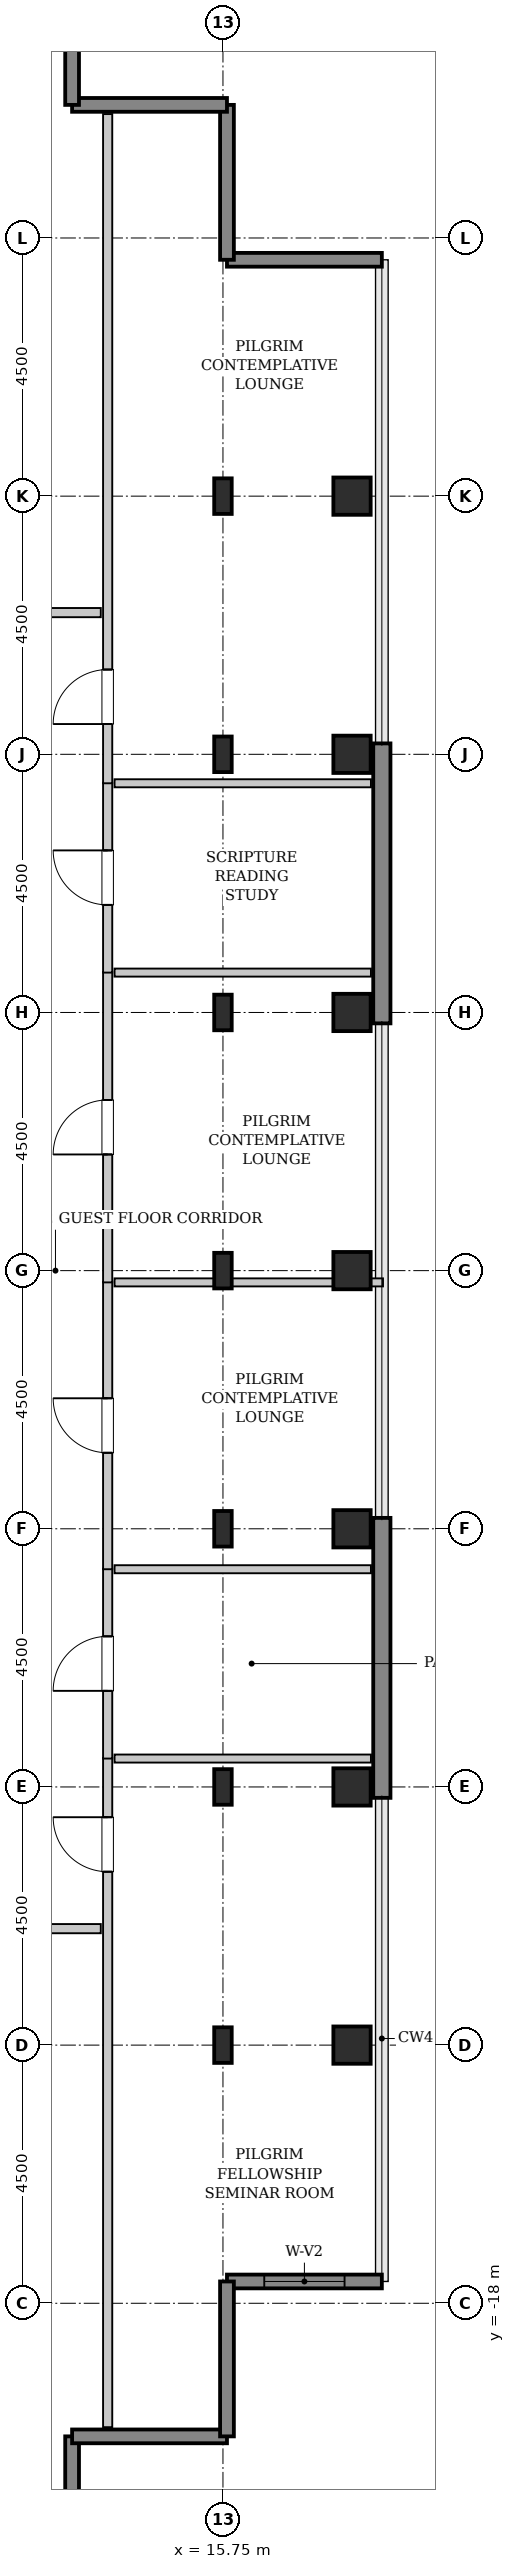
"""IFC4 building model, lengths in metres.
Left out: names, types, materials, properties, quantities, classifications, styles, units other than length and angle.
Written with IfcOpenShell. Run it as: python <this file> out.ifc"""

import sys

from ifc_helpers import new_model, si_unit, direction, frame, frame_2d, origin, origin_2d, place, context, subcontext, project, spatial, rectangle, hollow_rectangle, i_section, extrude, source, transform, mapped, element, fill, save


model = new_model("IFC4")
c1 = context("Model", 3, precision=1e-05, world=origin(), true_north=direction((0.0, 1.0)))
c2 = subcontext(c1, "Body", "Model", "MODEL_VIEW")
j1 = project(units=[si_unit("LENGTHUNIT", "METRE"), si_unit("PLANEANGLEUNIT", "RADIAN")], contexts=[c1])
p1 = place(None, origin())
s1 = spatial("IfcSite", under=j1, at=p1, CompositionType="ELEMENT")
p2 = place(p1, origin())
s2 = spatial("IfcBuilding", under=s1, at=p2, CompositionType="ELEMENT")
p3 = place(p2, frame((0.0, 0.0, 287.4)))
s3 = spatial("IfcBuildingStorey", under=s2, at=p3, CompositionType="ELEMENT", Elevation=287.4)
m1 = source(origin(), c2, "Body", "SweptSolid", [
    extrude(i_section(OverallWidth=0.305, OverallDepth=0.62, WebThickness=0.021, FlangeThickness=0.04, FilletRadius=0.027, at=origin_2d()), origin(), (0.0, 0.0, 1.0), 3.8),
])
for number, where, z_axis, x_axis in (
    (1, (15.75, -13.5, 0.0), (0.0, 0.0, 1.0), (1.0, 0.0, 0.0)),
    (2, (15.75, -9.0, 0.0), (0.0, 0.0, 1.0), (1.0, 0.0, 0.0)),
    (3, (15.75, -4.5, 0.0), (0.0, 0.0, 1.0), (1.0, 0.0, 0.0)),
    (4, (15.75, 0.0, 0.0), (0.0, 0.0, 1.0), (1.0, 0.0, 0.0)),
    (5, (15.75, 4.5, 0.0), (0.0, 0.0, 1.0), (1.0, 0.0, 0.0)),
    (6, (15.75, 9.0, 0.0), (0.0, 0.0, 1.0), (1.0, 0.0, 0.0)),
    (7, (15.75, 13.5, 0.0), (0.0, 0.0, 1.0), (1.0, 0.0, 0.0)),
):
    element("IfcColumn", number, at=place(p3, frame(where, z_axis=z_axis, x_axis=x_axis)), inside=s3, PredefinedType="COLUMN", context=c2, shape_type="MappedRepresentation", body=[
        mapped(m1, transform((0.0, 0.0, 0.0), x_axis=(1.0, 0.0, 0.0), y_axis=(0.0, 1.0, 0.0), z_axis=(0.0, 0.0, 1.0), scale=1.0)),
    ])
m2 = source(origin(), c2, "Body", "SweptSolid", [
    extrude(hollow_rectangle(XDim=0.65, YDim=0.65, WallThickness=0.032, InnerFilletRadius=0.032, OuterFilletRadius=0.064, at=origin_2d()), origin(), (0.0, 0.0, 1.0), 3.8),
])
for number, where, z_axis, x_axis in (
    (8, (18.0, -13.5, 0.0), (0.0, 0.0, 1.0), (1.0, 0.0, 0.0)),
    (9, (18.0, -9.0, 0.0), (0.0, 0.0, 1.0), (1.0, 0.0, 0.0)),
    (10, (18.0, -4.5, 0.0), (0.0, 0.0, 1.0), (1.0, 0.0, 0.0)),
    (11, (18.0, 0.0, 0.0), (0.0, 0.0, 1.0), (1.0, 0.0, 0.0)),
    (12, (18.0, 4.5, 0.0), (0.0, 0.0, 1.0), (1.0, 0.0, 0.0)),
    (13, (18.0, 9.0, 0.0), (0.0, 0.0, 1.0), (1.0, 0.0, 0.0)),
    (14, (18.0, 13.5, 0.0), (0.0, 0.0, 1.0), (1.0, 0.0, 0.0)),
):
    element("IfcColumn", number, at=place(p3, frame(where, z_axis=z_axis, x_axis=x_axis)), inside=s3, PredefinedType="COLUMN", context=c2, shape_type="MappedRepresentation", body=[
        mapped(m2, transform((0.0, 0.0, 0.0), x_axis=(1.0, 0.0, 0.0), y_axis=(0.0, 1.0, 0.0), z_axis=(0.0, 0.0, 1.0), scale=1.0)),
    ])
m3 = source(origin(), c2, "Body", "SweptSolid", [
    extrude(rectangle(XDim=4.88, YDim=0.3, at=frame_2d((2.44, 0.0))), origin(), (0.0, 0.0, 1.0), 3.55),
])
for number, where, z_axis, x_axis in (
    (15, (18.52, -9.19, 0.0), (0.0, 0.0, 1.0), (0.0, 1.0, 0.0)),
    (16, (18.52, 4.31, 0.0), (0.0, 0.0, 1.0), (0.0, 1.0, 0.0)),
):
    element("IfcWall", number, at=place(p3, frame(where, z_axis=z_axis, x_axis=x_axis)), inside=s3, PredefinedType="SHEAR", context=c2, shape_type="MappedRepresentation", body=[
        mapped(m3, transform((0.0, 0.0, 0.0), x_axis=(1.0, 0.0, 0.0), y_axis=(0.0, 1.0, 0.0), z_axis=(0.0, 0.0, 1.0), scale=1.0)),
    ])
m4 = source(origin(), c2, "Body", "SweptSolid", [
    extrude(rectangle(XDim=2.7, YDim=0.24, at=frame_2d((1.35, 0.0))), origin(), (0.0, 0.0, 1.0), 3.55),
])
p4 = place(p3, frame((15.82, -17.62, 0.0), z_axis=(0.0, 0.0, 1.0), x_axis=(1.0, 0.0, 0.0)))
e17 = element("IfcWall", 17, at=p4, inside=s3, PredefinedType="SHEAR", context=c2, shape_type="MappedRepresentation", body=[
    mapped(m4, transform((0.0, 0.0, 0.0), x_axis=(1.0, 0.0, 0.0), y_axis=(0.0, 1.0, 0.0), z_axis=(0.0, 0.0, 1.0), scale=1.0)),
])
p5 = place(p4, frame((0.65, 0.0, 0.85)))
e18 = element("IfcOpeningElement", 18, at=p5, cuts=e17, PredefinedType="OPENING", context=c2, shape_type="SweptSolid", body=[
    extrude(rectangle(XDim=1.4, YDim=1.8, at=frame_2d((0.7, 0.9))), frame((0.0, 0.13, 0.0), z_axis=(0.0, -1.0, 0.0), x_axis=(1.0, 0.0, 0.0)), (0.0, 0.0, 1.0), 0.26),
])
for number, where, z_axis, x_axis in (
    (19, (18.52, 17.62, 0.0), (0.0, 0.0, 1.0), (-1.0, 0.0, 0.0)),
    (20, (15.82, 17.62, 0.0), (0.0, 0.0, 1.0), (0.0, 1.0, 0.0)),
    (21, (15.82, 20.32, 0.0), (0.0, 0.0, 1.0), (-1.0, 0.0, 0.0)),
    (22, (13.12, 20.32, 0.0), (0.0, 0.0, 1.0), (0.0, 1.0, 0.0)),
    (23, (13.12, -23.02, 0.0), (0.0, 0.0, 1.0), (0.0, 1.0, 0.0)),
    (24, (13.12, -20.32, 0.0), (0.0, 0.0, 1.0), (1.0, 0.0, 0.0)),
    (25, (15.82, -20.32, 0.0), (0.0, 0.0, 1.0), (0.0, 1.0, 0.0)),
):
    element("IfcWall", number, at=place(p3, frame(where, z_axis=z_axis, x_axis=x_axis)), inside=s3, PredefinedType="SHEAR", context=c2, shape_type="MappedRepresentation", body=[
        mapped(m4, transform((0.0, 0.0, 0.0), x_axis=(1.0, 0.0, 0.0), y_axis=(0.0, 1.0, 0.0), z_axis=(0.0, 0.0, 1.0), scale=1.0)),
    ])
m5 = source(origin(), c2, "Body", "SweptSolid", [
    extrude(rectangle(XDim=11.665, YDim=0.16, at=frame_2d((5.833, 0.0))), origin(), (0.0, 0.0, 1.0), 3.535),
])
p6 = place(p3, frame((13.74, -20.16, 0.0), z_axis=(0.0, 0.0, 1.0), x_axis=(0.0, 1.0, 0.0)))
e26 = element("IfcWall", 26, at=p6, inside=s3, PredefinedType="PARTITIONING", context=c2, shape_type="MappedRepresentation", body=[
    mapped(m5, transform((0.0, 0.0, 0.0), x_axis=(1.0, 0.0, 0.0), y_axis=(0.0, 1.0, 0.0), z_axis=(0.0, 0.0, 1.0), scale=1.0)),
])
p7 = place(p6, frame((9.683, 0.0, 0.0)))
e27 = element("IfcOpeningElement", 27, at=p7, cuts=e26, PredefinedType="OPENING", context=c2, shape_type="SweptSolid", body=[
    extrude(rectangle(XDim=0.95, YDim=2.1, at=frame_2d((0.475, 1.05))), frame((0.0, 0.09, 0.0), z_axis=(0.0, -1.0, 0.0), x_axis=(1.0, 0.0, 0.0)), (0.0, 0.0, 1.0), 0.18),
])
m6 = source(origin(), c2, "Body", "SweptSolid", [
    extrude(rectangle(XDim=4.47, YDim=0.14, at=frame_2d((2.235, 0.0))), origin(), (0.0, 0.0, 1.0), 2.925),
])
p8 = place(p3, frame((13.86, -8.505, 0.0), z_axis=(0.0, 0.0, 1.0), x_axis=(1.0, 0.0, 0.0)))
e28 = element("IfcWall", 28, at=p8, inside=s3, PredefinedType="PARTITIONING", context=c2, shape_type="MappedRepresentation", body=[
    mapped(m6, transform((0.0, 0.0, 0.0), x_axis=(1.0, 0.0, 0.0), y_axis=(0.0, 1.0, 0.0), z_axis=(0.0, 0.0, 1.0), scale=1.0)),
])
m7 = source(origin(), c2, "Body", "SweptSolid", [
    extrude(rectangle(XDim=3.31, YDim=0.16, at=frame_2d((1.655, 0.0))), origin(), (0.0, 0.0, 1.0), 3.535),
])
p9 = place(p3, frame((13.74, -8.505, 0.0), z_axis=(0.0, 0.0, 1.0), x_axis=(0.0, 1.0, 0.0)))
e29 = element("IfcWall", 29, at=p9, inside=s3, PredefinedType="PARTITIONING", context=c2, shape_type="MappedRepresentation", body=[
    mapped(m7, transform((0.0, 0.0, 0.0), x_axis=(1.0, 0.0, 0.0), y_axis=(0.0, 1.0, 0.0), z_axis=(0.0, 0.0, 1.0), scale=1.0)),
])
p10 = place(p9, frame((1.18, 0.0, 0.0)))
e30 = element("IfcOpeningElement", 30, at=p10, cuts=e29, PredefinedType="OPENING", context=c2, shape_type="SweptSolid", body=[
    extrude(rectangle(XDim=0.95, YDim=2.1, at=frame_2d((0.475, 1.05))), frame((0.0, 0.09, 0.0), z_axis=(0.0, -1.0, 0.0), x_axis=(1.0, 0.0, 0.0)), (0.0, 0.0, 1.0), 0.18),
])
m8 = source(origin(), c2, "Body", "SweptSolid", [
    extrude(rectangle(XDim=4.47, YDim=0.14, at=frame_2d((2.235, 0.0))), origin(), (0.0, 0.0, 1.0), 3.535),
])
p11 = place(p3, frame((13.86, -5.205, 0.0), z_axis=(0.0, 0.0, 1.0), x_axis=(1.0, 0.0, 0.0)))
e31 = element("IfcWall", 31, at=p11, inside=s3, PredefinedType="PARTITIONING", context=c2, shape_type="MappedRepresentation", body=[
    mapped(m8, transform((0.0, 0.0, 0.0), x_axis=(1.0, 0.0, 0.0), y_axis=(0.0, 1.0, 0.0), z_axis=(0.0, 0.0, 1.0), scale=1.0)),
])
m9 = source(origin(), c2, "Body", "SweptSolid", [
    extrude(rectangle(XDim=5.01, YDim=0.16, at=frame_2d((2.505, 0.0))), origin(), (0.0, 0.0, 1.0), 3.535),
])
p12 = place(p3, frame((13.74, -5.205, 0.0), z_axis=(0.0, 0.0, 1.0), x_axis=(0.0, 1.0, 0.0)))
e32 = element("IfcWall", 32, at=p12, inside=s3, PredefinedType="PARTITIONING", context=c2, shape_type="MappedRepresentation", body=[
    mapped(m9, transform((0.0, 0.0, 0.0), x_axis=(1.0, 0.0, 0.0), y_axis=(0.0, 1.0, 0.0), z_axis=(0.0, 0.0, 1.0), scale=1.0)),
])
p13 = place(p12, frame((2.03, 0.0, 0.0)))
e33 = element("IfcOpeningElement", 33, at=p13, cuts=e32, PredefinedType="OPENING", context=c2, shape_type="SweptSolid", body=[
    extrude(rectangle(XDim=0.95, YDim=2.1, at=frame_2d((0.475, 1.05))), frame((0.0, 0.09, 0.0), z_axis=(0.0, -1.0, 0.0), x_axis=(1.0, 0.0, 0.0)), (0.0, 0.0, 1.0), 0.18),
])
m10 = source(origin(), c2, "Body", "SweptSolid", [
    extrude(rectangle(XDim=4.68, YDim=0.14, at=frame_2d((2.34, 0.0))), origin(), (0.0, 0.0, 1.0), 2.925),
])
p14 = place(p3, frame((13.86, -0.205, 0.0), z_axis=(0.0, 0.0, 1.0), x_axis=(1.0, 0.0, 0.0)))
e34 = element("IfcWall", 34, at=p14, inside=s3, PredefinedType="PARTITIONING", context=c2, shape_type="MappedRepresentation", body=[
    mapped(m10, transform((0.0, 0.0, 0.0), x_axis=(1.0, 0.0, 0.0), y_axis=(0.0, 1.0, 0.0), z_axis=(0.0, 0.0, 1.0), scale=1.0)),
])
m11 = source(origin(), c2, "Body", "SweptSolid", [
    extrude(rectangle(XDim=5.41, YDim=0.16, at=frame_2d((2.705, 0.0))), origin(), (0.0, 0.0, 1.0), 3.535),
])
p15 = place(p3, frame((13.74, -0.205, 0.0), z_axis=(0.0, 0.0, 1.0), x_axis=(0.0, 1.0, 0.0)))
e35 = element("IfcWall", 35, at=p15, inside=s3, PredefinedType="PARTITIONING", context=c2, shape_type="MappedRepresentation", body=[
    mapped(m11, transform((0.0, 0.0, 0.0), x_axis=(1.0, 0.0, 0.0), y_axis=(0.0, 1.0, 0.0), z_axis=(0.0, 0.0, 1.0), scale=1.0)),
])
p16 = place(p15, frame((2.23, 0.0, 0.0)))
e36 = element("IfcOpeningElement", 36, at=p16, cuts=e35, PredefinedType="OPENING", context=c2, shape_type="SweptSolid", body=[
    extrude(rectangle(XDim=0.95, YDim=2.1, at=frame_2d((0.475, 1.05))), frame((0.0, 0.09, 0.0), z_axis=(0.0, -1.0, 0.0), x_axis=(1.0, 0.0, 0.0)), (0.0, 0.0, 1.0), 0.18),
])
p17 = place(p3, frame((13.86, 5.195, 0.0), z_axis=(0.0, 0.0, 1.0), x_axis=(1.0, 0.0, 0.0)))
e37 = element("IfcWall", 37, at=p17, inside=s3, PredefinedType="PARTITIONING", context=c2, shape_type="MappedRepresentation", body=[
    mapped(m8, transform((0.0, 0.0, 0.0), x_axis=(1.0, 0.0, 0.0), y_axis=(0.0, 1.0, 0.0), z_axis=(0.0, 0.0, 1.0), scale=1.0)),
])
p18 = place(p3, frame((13.74, 5.195, 0.0), z_axis=(0.0, 0.0, 1.0), x_axis=(0.0, 1.0, 0.0)))
e38 = element("IfcWall", 38, at=p18, inside=s3, PredefinedType="PARTITIONING", context=c2, shape_type="MappedRepresentation", body=[
    mapped(m7, transform((0.0, 0.0, 0.0), x_axis=(1.0, 0.0, 0.0), y_axis=(0.0, 1.0, 0.0), z_axis=(0.0, 0.0, 1.0), scale=1.0)),
])
p19 = place(p18, frame((1.18, 0.0, 0.0)))
e39 = element("IfcOpeningElement", 39, at=p19, cuts=e38, PredefinedType="OPENING", context=c2, shape_type="SweptSolid", body=[
    extrude(rectangle(XDim=0.95, YDim=2.1, at=frame_2d((0.475, 1.05))), frame((0.0, 0.09, 0.0), z_axis=(0.0, -1.0, 0.0), x_axis=(1.0, 0.0, 0.0)), (0.0, 0.0, 1.0), 0.18),
])
p20 = place(p3, frame((13.86, 8.495, 0.0), z_axis=(0.0, 0.0, 1.0), x_axis=(1.0, 0.0, 0.0)))
e40 = element("IfcWall", 40, at=p20, inside=s3, PredefinedType="PARTITIONING", context=c2, shape_type="MappedRepresentation", body=[
    mapped(m6, transform((0.0, 0.0, 0.0), x_axis=(1.0, 0.0, 0.0), y_axis=(0.0, 1.0, 0.0), z_axis=(0.0, 0.0, 1.0), scale=1.0)),
])
p21 = place(p3, frame((13.74, 8.495, 0.0), z_axis=(0.0, 0.0, 1.0), x_axis=(0.0, 1.0, 0.0)))
e41 = element("IfcWall", 41, at=p21, inside=s3, PredefinedType="PARTITIONING", context=c2, shape_type="MappedRepresentation", body=[
    mapped(m5, transform((0.0, 0.0, 0.0), x_axis=(1.0, 0.0, 0.0), y_axis=(0.0, 1.0, 0.0), z_axis=(0.0, 0.0, 1.0), scale=1.0)),
])
p22 = place(p21, frame((1.032, 0.0, 0.0)))
e42 = element("IfcOpeningElement", 42, at=p22, cuts=e41, PredefinedType="OPENING", context=c2, shape_type="SweptSolid", body=[
    extrude(rectangle(XDim=0.95, YDim=2.1, at=frame_2d((0.475, 1.05))), frame((0.0, 0.09, 0.0), z_axis=(0.0, -1.0, 0.0), x_axis=(1.0, 0.0, 0.0)), (0.0, 0.0, 1.0), 0.18),
])
m12 = source(origin(), c2, "Body", "SweptSolid", [
    extrude(rectangle(XDim=5.825, YDim=0.16, at=frame_2d((2.913, 0.0))), origin(), (0.0, 0.0, 1.0), 3.535),
])
p23 = place(p3, frame((7.795, 11.47, 0.0), z_axis=(0.0, 0.0, 1.0), x_axis=(1.0, 0.0, 0.0)))
e43 = element("IfcWall", 43, at=p23, inside=s3, PredefinedType="PARTITIONING", context=c2, shape_type="MappedRepresentation", body=[
    mapped(m12, transform((0.0, 0.0, 0.0), x_axis=(1.0, 0.0, 0.0), y_axis=(0.0, 1.0, 0.0), z_axis=(0.0, 0.0, 1.0), scale=1.0)),
])
p24 = place(p23, frame((2.438, 0.0, 0.0)))
e44 = element("IfcOpeningElement", 44, at=p24, cuts=e43, PredefinedType="OPENING", context=c2, shape_type="SweptSolid", body=[
    extrude(rectangle(XDim=0.95, YDim=2.1, at=frame_2d((0.475, 1.05))), frame((0.0, 0.09, 0.0), z_axis=(0.0, -1.0, 0.0), x_axis=(1.0, 0.0, 0.0)), (0.0, 0.0, 1.0), 0.18),
])
p25 = place(p3, frame((7.795, -11.47, 0.0), z_axis=(0.0, 0.0, 1.0), x_axis=(1.0, 0.0, 0.0)))
e45 = element("IfcWall", 45, at=p25, inside=s3, PredefinedType="PARTITIONING", context=c2, shape_type="MappedRepresentation", body=[
    mapped(m12, transform((0.0, 0.0, 0.0), x_axis=(1.0, 0.0, 0.0), y_axis=(0.0, 1.0, 0.0), z_axis=(0.0, 0.0, 1.0), scale=1.0)),
])
p26 = place(p25, frame((2.438, 0.0, 0.0)))
e46 = element("IfcOpeningElement", 46, at=p26, cuts=e45, PredefinedType="OPENING", context=c2, shape_type="SweptSolid", body=[
    extrude(rectangle(XDim=0.95, YDim=2.1, at=frame_2d((0.475, 1.05))), frame((0.0, 0.09, 0.0), z_axis=(0.0, -1.0, 0.0), x_axis=(1.0, 0.0, 0.0)), (0.0, 0.0, 1.0), 0.18),
])
m13 = source(origin(), c2, "Body", "SweptSolid", [
    extrude(rectangle(XDim=1.4, YDim=1.8, at=frame_2d((0.7, 0.9))), frame((0.0, 0.03, 0.0), z_axis=(0.0, -1.0, 0.0), x_axis=(1.0, 0.0, 0.0)), (0.0, 0.0, 1.0), 0.06),
])
p27 = place(p5, origin())
e47 = element("IfcWindow", 47, at=p27, inside=s3, PartitioningType="SINGLE_PANEL", PredefinedType="WINDOW", context=c2, shape_type="MappedRepresentation", body=[
    mapped(m13, transform((0.0, 0.0, 0.0), x_axis=(1.0, 0.0, 0.0), y_axis=(0.0, 1.0, 0.0), z_axis=(0.0, 0.0, 1.0), scale=1.0)),
])
fill(e18, e47)
m14 = source(origin(), c2, "Body", "SweptSolid", [
    extrude(rectangle(XDim=0.95, YDim=2.1, at=frame_2d((0.475, 1.05))), frame((0.0, 0.025, 0.0), z_axis=(0.0, -1.0, 0.0), x_axis=(1.0, 0.0, 0.0)), (0.0, 0.0, 1.0), 0.05),
])
p28 = place(p7, origin())
e48 = element("IfcDoor", 48, at=p28, inside=s3, OperationType="SINGLE_SWING_RIGHT", PredefinedType="DOOR", context=c2, shape_type="MappedRepresentation", body=[
    mapped(m14, transform((0.0, 0.0, 0.0), x_axis=(1.0, 0.0, 0.0), y_axis=(0.0, 1.0, 0.0), z_axis=(0.0, 0.0, 1.0), scale=1.0)),
])
fill(e27, e48)
p29 = place(p10, origin())
e49 = element("IfcDoor", 49, at=p29, inside=s3, OperationType="SINGLE_SWING_LEFT", PredefinedType="DOOR", context=c2, shape_type="MappedRepresentation", body=[
    mapped(m14, transform((0.0, 0.0, 0.0), x_axis=(1.0, 0.0, 0.0), y_axis=(0.0, 1.0, 0.0), z_axis=(0.0, 0.0, 1.0), scale=1.0)),
])
fill(e30, e49)
p30 = place(p13, origin())
e50 = element("IfcDoor", 50, at=p30, inside=s3, OperationType="SINGLE_SWING_RIGHT", PredefinedType="DOOR", context=c2, shape_type="MappedRepresentation", body=[
    mapped(m14, transform((0.0, 0.0, 0.0), x_axis=(1.0, 0.0, 0.0), y_axis=(0.0, 1.0, 0.0), z_axis=(0.0, 0.0, 1.0), scale=1.0)),
])
fill(e33, e50)
p31 = place(p16, origin())
e51 = element("IfcDoor", 51, at=p31, inside=s3, OperationType="SINGLE_SWING_LEFT", PredefinedType="DOOR", context=c2, shape_type="MappedRepresentation", body=[
    mapped(m14, transform((0.0, 0.0, 0.0), x_axis=(1.0, 0.0, 0.0), y_axis=(0.0, 1.0, 0.0), z_axis=(0.0, 0.0, 1.0), scale=1.0)),
])
fill(e36, e51)
p32 = place(p19, origin())
e52 = element("IfcDoor", 52, at=p32, inside=s3, OperationType="SINGLE_SWING_RIGHT", PredefinedType="DOOR", context=c2, shape_type="MappedRepresentation", body=[
    mapped(m14, transform((0.0, 0.0, 0.0), x_axis=(1.0, 0.0, 0.0), y_axis=(0.0, 1.0, 0.0), z_axis=(0.0, 0.0, 1.0), scale=1.0)),
])
fill(e39, e52)
p33 = place(p22, origin())
e53 = element("IfcDoor", 53, at=p33, inside=s3, OperationType="SINGLE_SWING_LEFT", PredefinedType="DOOR", context=c2, shape_type="MappedRepresentation", body=[
    mapped(m14, transform((0.0, 0.0, 0.0), x_axis=(1.0, 0.0, 0.0), y_axis=(0.0, 1.0, 0.0), z_axis=(0.0, 0.0, 1.0), scale=1.0)),
])
fill(e42, e53)
save(model, sys.argv[1])
